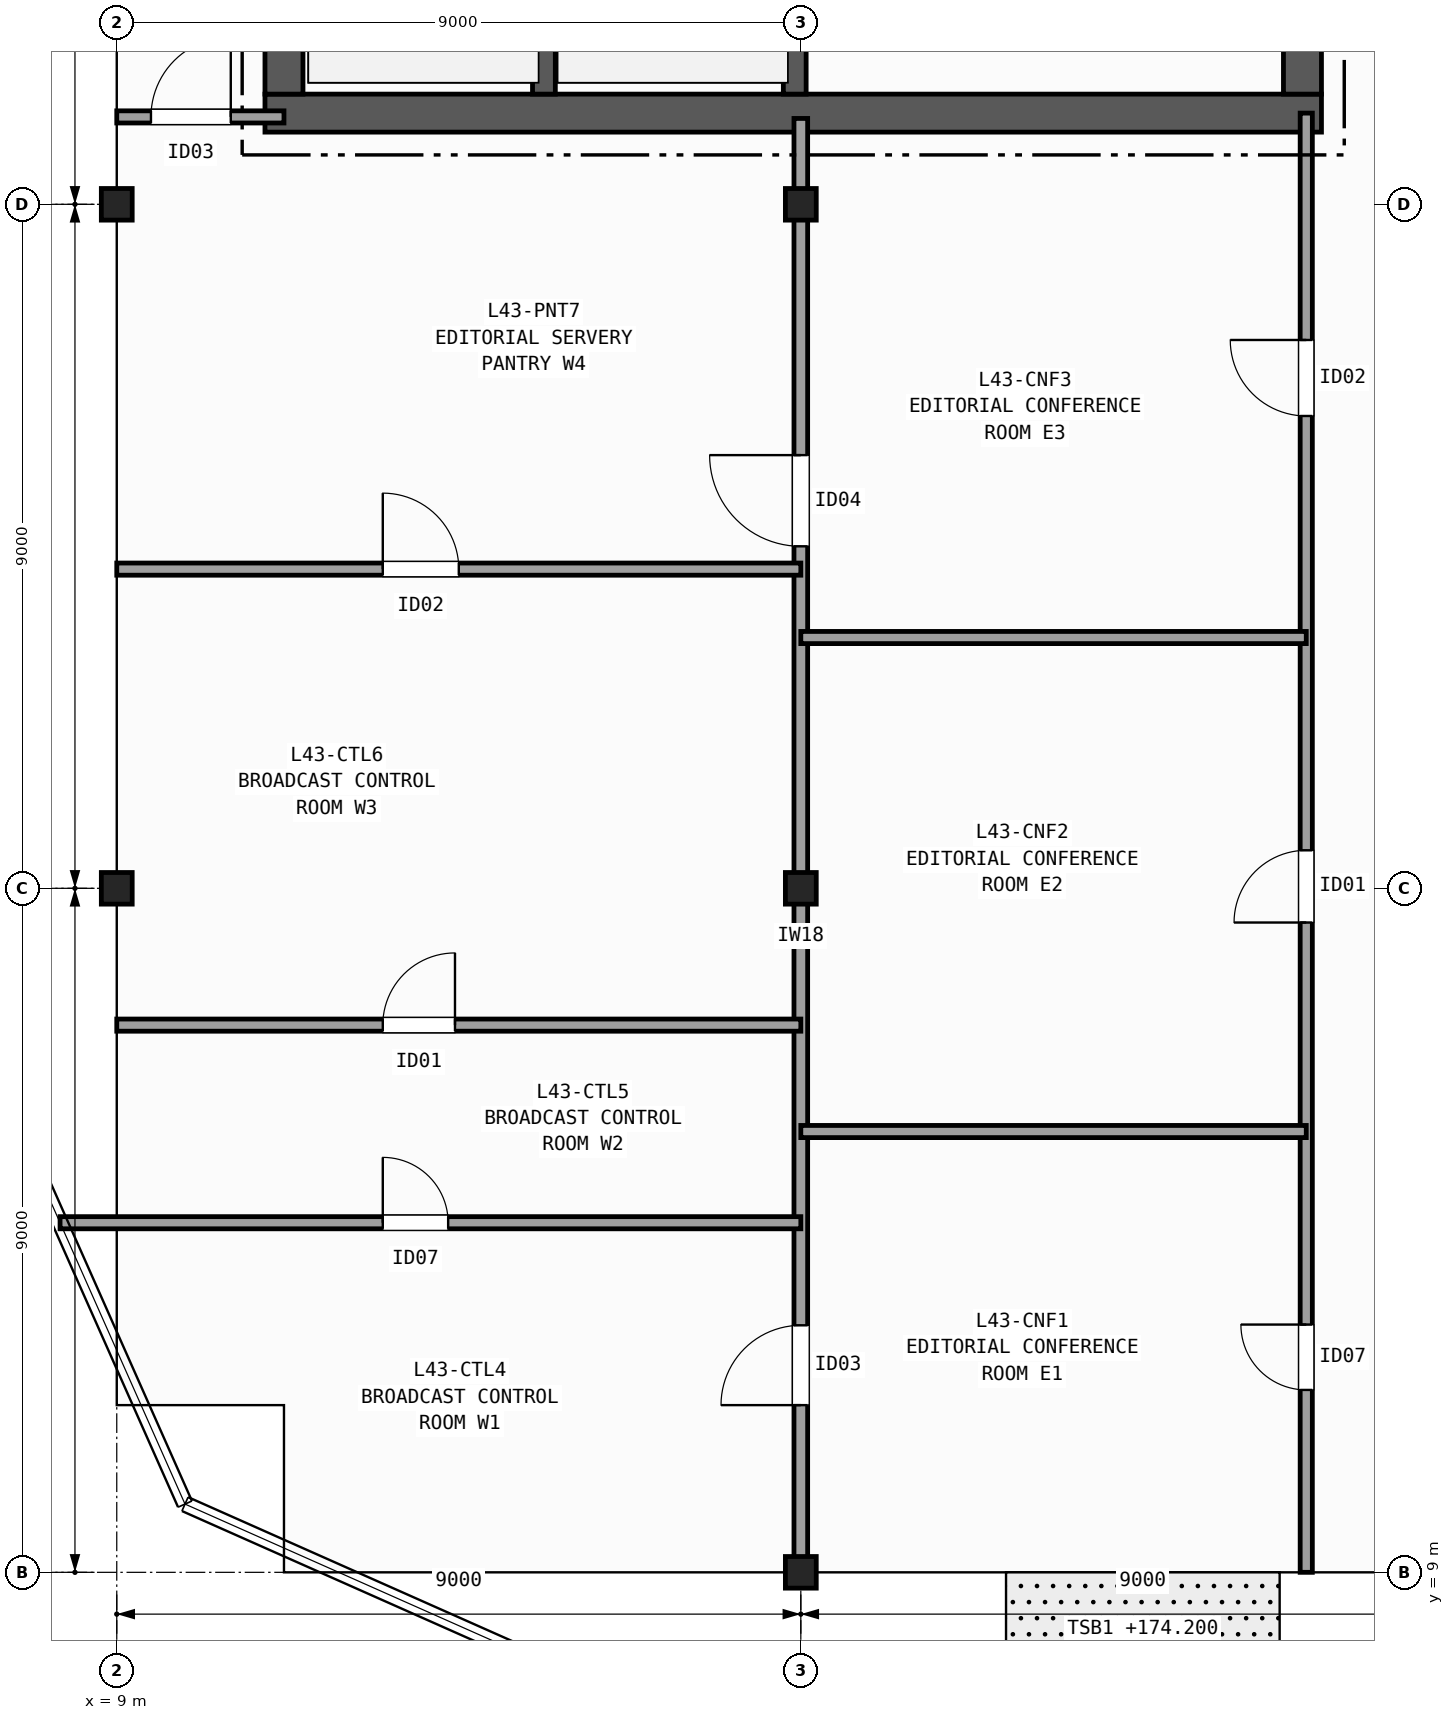
"""IFC4 building model, lengths in metres.
Left out: names, types, materials, properties, quantities, classifications, styles, units other than length and angle.
Written with IfcOpenShell. Run it as: python <this file> out.ifc"""

import sys

from ifc_helpers import new_model, si_unit, direction, frame, frame_2d, origin, origin_2d, place, context, subcontext, project, spatial, rectangle, i_section, extrude, element, fill, save


model = new_model("IFC4")
c1 = context("Model", 3, precision=1e-05, world=origin(), true_north=direction((0.0, 1.0)))
c2 = subcontext(c1, "Body", "Model", "MODEL_VIEW")
j1 = project(units=[si_unit("LENGTHUNIT", "METRE"), si_unit("PLANEANGLEUNIT", "RADIAN")], contexts=[c1])
p1 = place(None, origin())
s1 = spatial("IfcSite", under=j1, at=p1, CompositionType="ELEMENT")
p2 = place(p1, origin())
s2 = spatial("IfcBuilding", under=s1, at=p2, CompositionType="ELEMENT")
p3 = place(p2, frame((0.0, 0.0, 174.2)))
s3 = spatial("IfcBuildingStorey", under=s2, at=p3, CompositionType="ELEMENT", Elevation=174.2)
for number, where, z_axis, x_axis in (
    (1, (9.0, 18.0, 0.0), (0.0, 0.0, 1.0), (1.0, 0.0, 0.0)),
    (2, (9.0, 27.0, 0.0), (0.0, 0.0, 1.0), (1.0, 0.0, 0.0)),
    (3, (18.0, 9.0, 0.0), (0.0, 0.0, 1.0), (1.0, 0.0, 0.0)),
    (4, (18.0, 18.0, 0.0), (0.0, 0.0, 1.0), (1.0, 0.0, 0.0)),
    (5, (18.0, 27.0, 0.0), (0.0, 0.0, 1.0), (1.0, 0.0, 0.0)),
):
    element("IfcColumn", number, at=place(p3, frame(where, z_axis=z_axis, x_axis=x_axis)), inside=s3, PredefinedType="COLUMN", context=c2, shape_type="SweptSolid", body=[
        extrude(i_section(OverallWidth=0.406, OverallDepth=0.416, WebThickness=0.03, FlangeThickness=0.048, FilletRadius=0.015, at=origin_2d()), origin(), (0.0, 0.0, 1.0), 3.7),
    ])
p4 = place(p3, frame((10.95, 28.2, 0.0), z_axis=(0.0, 0.0, 1.0), x_axis=(1.0, 0.0, 0.0)))
e6 = element("IfcWall", 6, at=p4, inside=s3, PredefinedType="SHEAR", context=c2, shape_type="SweptSolid", body=[
    extrude(rectangle(XDim=13.9, YDim=0.5, at=frame_2d((6.95, 0.0))), origin(), (0.0, 0.0, 1.0), 3.42),
])
p5 = place(p3, frame((11.2, 42.15, 0.0), z_axis=(0.0, 0.0, 1.0), x_axis=(0.0, -1.0, 0.0)))
e7 = element("IfcWall", 7, at=p5, inside=s3, PredefinedType="SHEAR", context=c2, shape_type="SweptSolid", body=[
    extrude(rectangle(XDim=13.7, YDim=0.5, at=frame_2d((6.85, 0.0))), origin(), (0.0, 0.0, 1.0), 3.42),
])
p6 = place(p3, frame((24.6, 28.45, 0.0), z_axis=(0.0, 0.0, 1.0), x_axis=(0.0, 1.0, 0.0)))
e8 = element("IfcWall", 8, at=p6, inside=s3, PredefinedType="SHEAR", context=c2, shape_type="SweptSolid", body=[
    extrude(rectangle(XDim=13.7, YDim=0.5, at=frame_2d((6.85, 0.0))), origin(), (0.0, 0.0, 1.0), 3.42),
])
p7 = place(p6, frame((3.35, 0.0, 0.0)))
e9 = element("IfcOpeningElement", 9, at=p7, cuts=e8, PredefinedType="OPENING", context=c2, shape_type="SweptSolid", body=[
    extrude(rectangle(XDim=1.5, YDim=2.2, at=frame_2d((0.75, 1.1))), frame((0.0, 0.26, 0.0), z_axis=(0.0, -1.0, 0.0), x_axis=(1.0, 0.0, 0.0)), (0.0, 0.0, 1.0), 0.52),
])
p8 = place(p6, frame((9.95, 0.0, 0.0)))
e10 = element("IfcOpeningElement", 10, at=p8, cuts=e8, PredefinedType="OPENING", context=c2, shape_type="SweptSolid", body=[
    extrude(rectangle(XDim=0.9, YDim=2.1, at=frame_2d((0.45, 1.05))), frame((0.0, 0.26, 0.0), z_axis=(0.0, -1.0, 0.0), x_axis=(1.0, 0.0, 0.0)), (0.0, 0.0, 1.0), 0.52),
])
p9 = place(p6, frame((12.05, 0.0, 0.0)))
e11 = element("IfcOpeningElement", 11, at=p9, cuts=e8, PredefinedType="OPENING", context=c2, shape_type="SweptSolid", body=[
    extrude(rectangle(XDim=0.9, YDim=2.1, at=frame_2d((0.45, 1.05))), frame((0.0, 0.26, 0.0), z_axis=(0.0, -1.0, 0.0), x_axis=(1.0, 0.0, 0.0)), (0.0, 0.0, 1.0), 0.52),
])
p10 = place(p3, frame((14.62, 28.45, 0.0), z_axis=(0.0, 0.0, 1.0), x_axis=(0.0, 1.0, 0.0)))
e12 = element("IfcWall", 12, at=p10, inside=s3, PredefinedType="SHEAR", context=c2, shape_type="SweptSolid", body=[
    extrude(rectangle(XDim=9.0, YDim=0.3, at=frame_2d((4.5, 0.0))), origin(), (0.0, 0.0, 1.0), 3.42),
])
p11 = place(p3, frame((17.92, 42.15, 0.0), z_axis=(0.0, 0.0, 1.0), x_axis=(0.0, -1.0, 0.0)))
e13 = element("IfcWall", 13, at=p11, inside=s3, PredefinedType="SHEAR", context=c2, shape_type="SweptSolid", body=[
    extrude(rectangle(XDim=13.7, YDim=0.3, at=frame_2d((6.85, 0.0))), origin(), (0.0, 0.0, 1.0), 3.42),
])
p12 = place(p11, frame((1.975, 0.0, 0.0)))
e14 = element("IfcOpeningElement", 14, at=p12, cuts=e13, PredefinedType="OPENING", context=c2, shape_type="SweptSolid", body=[
    extrude(rectangle(XDim=1.15, YDim=2.15, at=frame_2d((0.575, 1.075))), frame((0.0, 0.16, 0.0), z_axis=(0.0, -1.0, 0.0), x_axis=(1.0, 0.0, 0.0)), (0.0, 0.0, 1.0), 0.32),
])
p13 = place(p3, frame((9.0, 28.15, 0.0), z_axis=(0.0, 0.0, 1.0), x_axis=(1.0, 0.0, 0.0)))
e15 = element("IfcWall", 15, at=p13, inside=s3, PredefinedType="PARTITIONING", context=c2, shape_type="SweptSolid", body=[
    extrude(rectangle(XDim=2.2, YDim=0.16, at=frame_2d((1.1, 0.0))), origin(), (0.0, 0.0, 1.0), 2.634),
])
p14 = place(p13, frame((0.45, 0.0, 0.0)))
e16 = element("IfcOpeningElement", 16, at=p14, cuts=e15, PredefinedType="OPENING", context=c2, shape_type="SweptSolid", body=[
    extrude(rectangle(XDim=1.05, YDim=2.15, at=frame_2d((0.525, 1.075))), frame((0.0, 0.09, 0.0), z_axis=(0.0, -1.0, 0.0), x_axis=(1.0, 0.0, 0.0)), (0.0, 0.0, 1.0), 0.18),
])
p15 = place(p3, frame((24.65, 9.0, 0.0), z_axis=(0.0, 0.0, 1.0), x_axis=(0.0, 1.0, 0.0)))
e17 = element("IfcWall", 17, at=p15, inside=s3, PredefinedType="PARTITIONING", context=c2, shape_type="SweptSolid", body=[
    extrude(rectangle(XDim=19.2, YDim=0.16, at=frame_2d((9.6, 0.0))), origin(), (0.0, 0.0, 1.0), 2.634),
])
p16 = place(p15, frame((2.4, 0.0, 0.0)))
e18 = element("IfcOpeningElement", 18, at=p16, cuts=e17, PredefinedType="OPENING", context=c2, shape_type="SweptSolid", body=[
    extrude(rectangle(XDim=0.86, YDim=2.05, at=frame_2d((0.43, 1.025))), frame((0.0, 0.09, 0.0), z_axis=(0.0, -1.0, 0.0), x_axis=(1.0, 0.0, 0.0)), (0.0, 0.0, 1.0), 0.18),
])
p17 = place(p15, frame((8.55, 0.0, 0.0)))
e19 = element("IfcOpeningElement", 19, at=p17, cuts=e17, PredefinedType="OPENING", context=c2, shape_type="SweptSolid", body=[
    extrude(rectangle(XDim=0.95, YDim=2.1, at=frame_2d((0.475, 1.05))), frame((0.0, 0.09, 0.0), z_axis=(0.0, -1.0, 0.0), x_axis=(1.0, 0.0, 0.0)), (0.0, 0.0, 1.0), 0.18),
])
p18 = place(p15, frame((15.215, 0.0, 0.0)))
e20 = element("IfcOpeningElement", 20, at=p18, cuts=e17, PredefinedType="OPENING", context=c2, shape_type="SweptSolid", body=[
    extrude(rectangle(XDim=1.0, YDim=2.1, at=frame_2d((0.5, 1.05))), frame((0.0, 0.09, 0.0), z_axis=(0.0, -1.0, 0.0), x_axis=(1.0, 0.0, 0.0)), (0.0, 0.0, 1.0), 0.18),
])
p19 = place(p3, frame((18.0, 9.0, 0.0), z_axis=(0.0, 0.0, 1.0), x_axis=(0.0, 1.0, 0.0)))
e21 = element("IfcWall", 21, at=p19, inside=s3, PredefinedType="PARTITIONING", context=c2, shape_type="SweptSolid", body=[
    extrude(rectangle(XDim=19.13, YDim=0.18, at=frame_2d((9.565, 0.0))), origin(), (0.0, 0.0, 1.0), 2.634),
])
p20 = place(p19, frame((2.2, 0.0, 0.0)))
e22 = element("IfcOpeningElement", 22, at=p20, cuts=e21, PredefinedType="OPENING", context=c2, shape_type="SweptSolid", body=[
    extrude(rectangle(XDim=1.05, YDim=2.15, at=frame_2d((0.525, 1.075))), frame((0.0, 0.1, 0.0), z_axis=(0.0, -1.0, 0.0), x_axis=(1.0, 0.0, 0.0)), (0.0, 0.0, 1.0), 0.2),
])
p21 = place(p19, frame((13.5, 0.0, 0.0)))
e23 = element("IfcOpeningElement", 23, at=p21, cuts=e21, PredefinedType="OPENING", context=c2, shape_type="SweptSolid", body=[
    extrude(rectangle(XDim=1.2, YDim=2.15, at=frame_2d((0.6, 1.075))), frame((0.0, 0.1, 0.0), z_axis=(0.0, -1.0, 0.0), x_axis=(1.0, 0.0, 0.0)), (0.0, 0.0, 1.0), 0.2),
])
for number, where, z_axis, x_axis in (
    (24, (18.0, 14.8, 0.0), (0.0, 0.0, 1.0), (1.0, 0.0, 0.0)),
    (25, (18.0, 21.3, 0.0), (0.0, 0.0, 1.0), (1.0, 0.0, 0.0)),
):
    element("IfcWall", number, at=place(p3, frame(where, z_axis=z_axis, x_axis=x_axis)), inside=s3, PredefinedType="PARTITIONING", context=c2, shape_type="SweptSolid", body=[
        extrude(rectangle(XDim=6.65, YDim=0.16, at=frame_2d((3.325, 0.0))), origin(), (0.0, 0.0, 1.0), 2.792),
    ])
p22 = place(p3, frame((8.254, 13.6, 0.0), z_axis=(0.0, 0.0, 1.0), x_axis=(1.0, 0.0, 0.0)))
e26 = element("IfcWall", 26, at=p22, inside=s3, PredefinedType="PARTITIONING", context=c2, shape_type="SweptSolid", body=[
    extrude(rectangle(XDim=9.746, YDim=0.16, at=frame_2d((4.873, 0.0))), origin(), (0.0, 0.0, 1.0), 2.792),
])
p23 = place(p22, frame((4.246, 0.0, 0.0)))
e27 = element("IfcOpeningElement", 27, at=p23, cuts=e26, PredefinedType="OPENING", context=c2, shape_type="SweptSolid", body=[
    extrude(rectangle(XDim=0.86, YDim=2.05, at=frame_2d((0.43, 1.025))), frame((0.0, 0.09, 0.0), z_axis=(0.0, -1.0, 0.0), x_axis=(1.0, 0.0, 0.0)), (0.0, 0.0, 1.0), 0.18),
])
p24 = place(p3, frame((9.0, 16.2, 0.0), z_axis=(0.0, 0.0, 1.0), x_axis=(1.0, 0.0, 0.0)))
e28 = element("IfcWall", 28, at=p24, inside=s3, PredefinedType="PARTITIONING", context=c2, shape_type="SweptSolid", body=[
    extrude(rectangle(XDim=9.0, YDim=0.16, at=frame_2d((4.5, 0.0))), origin(), (0.0, 0.0, 1.0), 2.792),
])
p25 = place(p24, frame((3.5, 0.0, 0.0)))
e29 = element("IfcOpeningElement", 29, at=p25, cuts=e28, PredefinedType="OPENING", context=c2, shape_type="SweptSolid", body=[
    extrude(rectangle(XDim=0.95, YDim=2.1, at=frame_2d((0.475, 1.05))), frame((0.0, 0.09, 0.0), z_axis=(0.0, -1.0, 0.0), x_axis=(1.0, 0.0, 0.0)), (0.0, 0.0, 1.0), 0.18),
])
p26 = place(p3, frame((9.0, 22.2, 0.0), z_axis=(0.0, 0.0, 1.0), x_axis=(1.0, 0.0, 0.0)))
e30 = element("IfcWall", 30, at=p26, inside=s3, PredefinedType="PARTITIONING", context=c2, shape_type="SweptSolid", body=[
    extrude(rectangle(XDim=9.0, YDim=0.16, at=frame_2d((4.5, 0.0))), origin(), (0.0, 0.0, 1.0), 2.634),
])
p27 = place(p26, frame((3.5, 0.0, 0.0)))
e31 = element("IfcOpeningElement", 31, at=p27, cuts=e30, PredefinedType="OPENING", context=c2, shape_type="SweptSolid", body=[
    extrude(rectangle(XDim=1.0, YDim=2.1, at=frame_2d((0.5, 1.05))), frame((0.0, 0.09, 0.0), z_axis=(0.0, -1.0, 0.0), x_axis=(1.0, 0.0, 0.0)), (0.0, 0.0, 1.0), 0.18),
])
p28 = place(p14, origin())
e32 = element("IfcDoor", 32, at=p28, inside=s3, OperationType="SINGLE_SWING_RIGHT", PredefinedType="DOOR", context=c2, shape_type="SweptSolid", body=[
    extrude(rectangle(XDim=1.05, YDim=2.15, at=frame_2d((0.525, 1.075))), frame((0.0, 0.025, 0.0), z_axis=(0.0, -1.0, 0.0), x_axis=(1.0, 0.0, 0.0)), (0.0, 0.0, 1.0), 0.05),
])
fill(e16, e32)
p29 = place(p16, origin())
e33 = element("IfcDoor", 33, at=p29, inside=s3, OperationType="SINGLE_SWING_RIGHT", PredefinedType="DOOR", context=c2, shape_type="SweptSolid", body=[
    extrude(rectangle(XDim=0.86, YDim=2.05, at=frame_2d((0.43, 1.025))), frame((0.0, 0.025, 0.0), z_axis=(0.0, -1.0, 0.0), x_axis=(1.0, 0.0, 0.0)), (0.0, 0.0, 1.0), 0.05),
])
fill(e18, e33)
p30 = place(p17, origin())
e34 = element("IfcDoor", 34, at=p30, inside=s3, OperationType="SINGLE_SWING_LEFT", PredefinedType="DOOR", context=c2, shape_type="SweptSolid", body=[
    extrude(rectangle(XDim=0.95, YDim=2.1, at=frame_2d((0.475, 1.05))), frame((0.0, 0.025, 0.0), z_axis=(0.0, -1.0, 0.0), x_axis=(1.0, 0.0, 0.0)), (0.0, 0.0, 1.0), 0.05),
])
fill(e19, e34)
p31 = place(p18, origin())
e35 = element("IfcDoor", 35, at=p31, inside=s3, OperationType="SINGLE_SWING_RIGHT", PredefinedType="DOOR", context=c2, shape_type="SweptSolid", body=[
    extrude(rectangle(XDim=1.0, YDim=2.1, at=frame_2d((0.5, 1.05))), frame((0.0, 0.025, 0.0), z_axis=(0.0, -1.0, 0.0), x_axis=(1.0, 0.0, 0.0)), (0.0, 0.0, 1.0), 0.05),
])
fill(e20, e35)
p32 = place(p20, origin())
e36 = element("IfcDoor", 36, at=p32, inside=s3, OperationType="SINGLE_SWING_LEFT", PredefinedType="DOOR", context=c2, shape_type="SweptSolid", body=[
    extrude(rectangle(XDim=1.05, YDim=2.15, at=frame_2d((0.525, 1.075))), frame((0.0, 0.025, 0.0), z_axis=(0.0, -1.0, 0.0), x_axis=(1.0, 0.0, 0.0)), (0.0, 0.0, 1.0), 0.05),
])
fill(e22, e36)
p33 = place(p21, origin())
e37 = element("IfcDoor", 37, at=p33, inside=s3, OperationType="SINGLE_SWING_RIGHT", PredefinedType="DOOR", context=c2, shape_type="SweptSolid", body=[
    extrude(rectangle(XDim=1.2, YDim=2.15, at=frame_2d((0.6, 1.075))), frame((0.0, 0.025, 0.0), z_axis=(0.0, -1.0, 0.0), x_axis=(1.0, 0.0, 0.0)), (0.0, 0.0, 1.0), 0.05),
])
fill(e23, e37)
p34 = place(p23, origin())
e38 = element("IfcDoor", 38, at=p34, inside=s3, OperationType="SINGLE_SWING_LEFT", PredefinedType="DOOR", context=c2, shape_type="SweptSolid", body=[
    extrude(rectangle(XDim=0.86, YDim=2.05, at=frame_2d((0.43, 1.025))), frame((0.0, 0.025, 0.0), z_axis=(0.0, -1.0, 0.0), x_axis=(1.0, 0.0, 0.0)), (0.0, 0.0, 1.0), 0.05),
])
fill(e27, e38)
p35 = place(p25, origin())
e39 = element("IfcDoor", 39, at=p35, inside=s3, OperationType="SINGLE_SWING_RIGHT", PredefinedType="DOOR", context=c2, shape_type="SweptSolid", body=[
    extrude(rectangle(XDim=0.95, YDim=2.1, at=frame_2d((0.475, 1.05))), frame((0.0, 0.025, 0.0), z_axis=(0.0, -1.0, 0.0), x_axis=(1.0, 0.0, 0.0)), (0.0, 0.0, 1.0), 0.05),
])
fill(e29, e39)
p36 = place(p27, origin())
e40 = element("IfcDoor", 40, at=p36, inside=s3, OperationType="SINGLE_SWING_LEFT", PredefinedType="DOOR", context=c2, shape_type="SweptSolid", body=[
    extrude(rectangle(XDim=1.0, YDim=2.1, at=frame_2d((0.5, 1.05))), frame((0.0, 0.025, 0.0), z_axis=(0.0, -1.0, 0.0), x_axis=(1.0, 0.0, 0.0)), (0.0, 0.0, 1.0), 0.05),
])
fill(e31, e40)
save(model, sys.argv[1])
